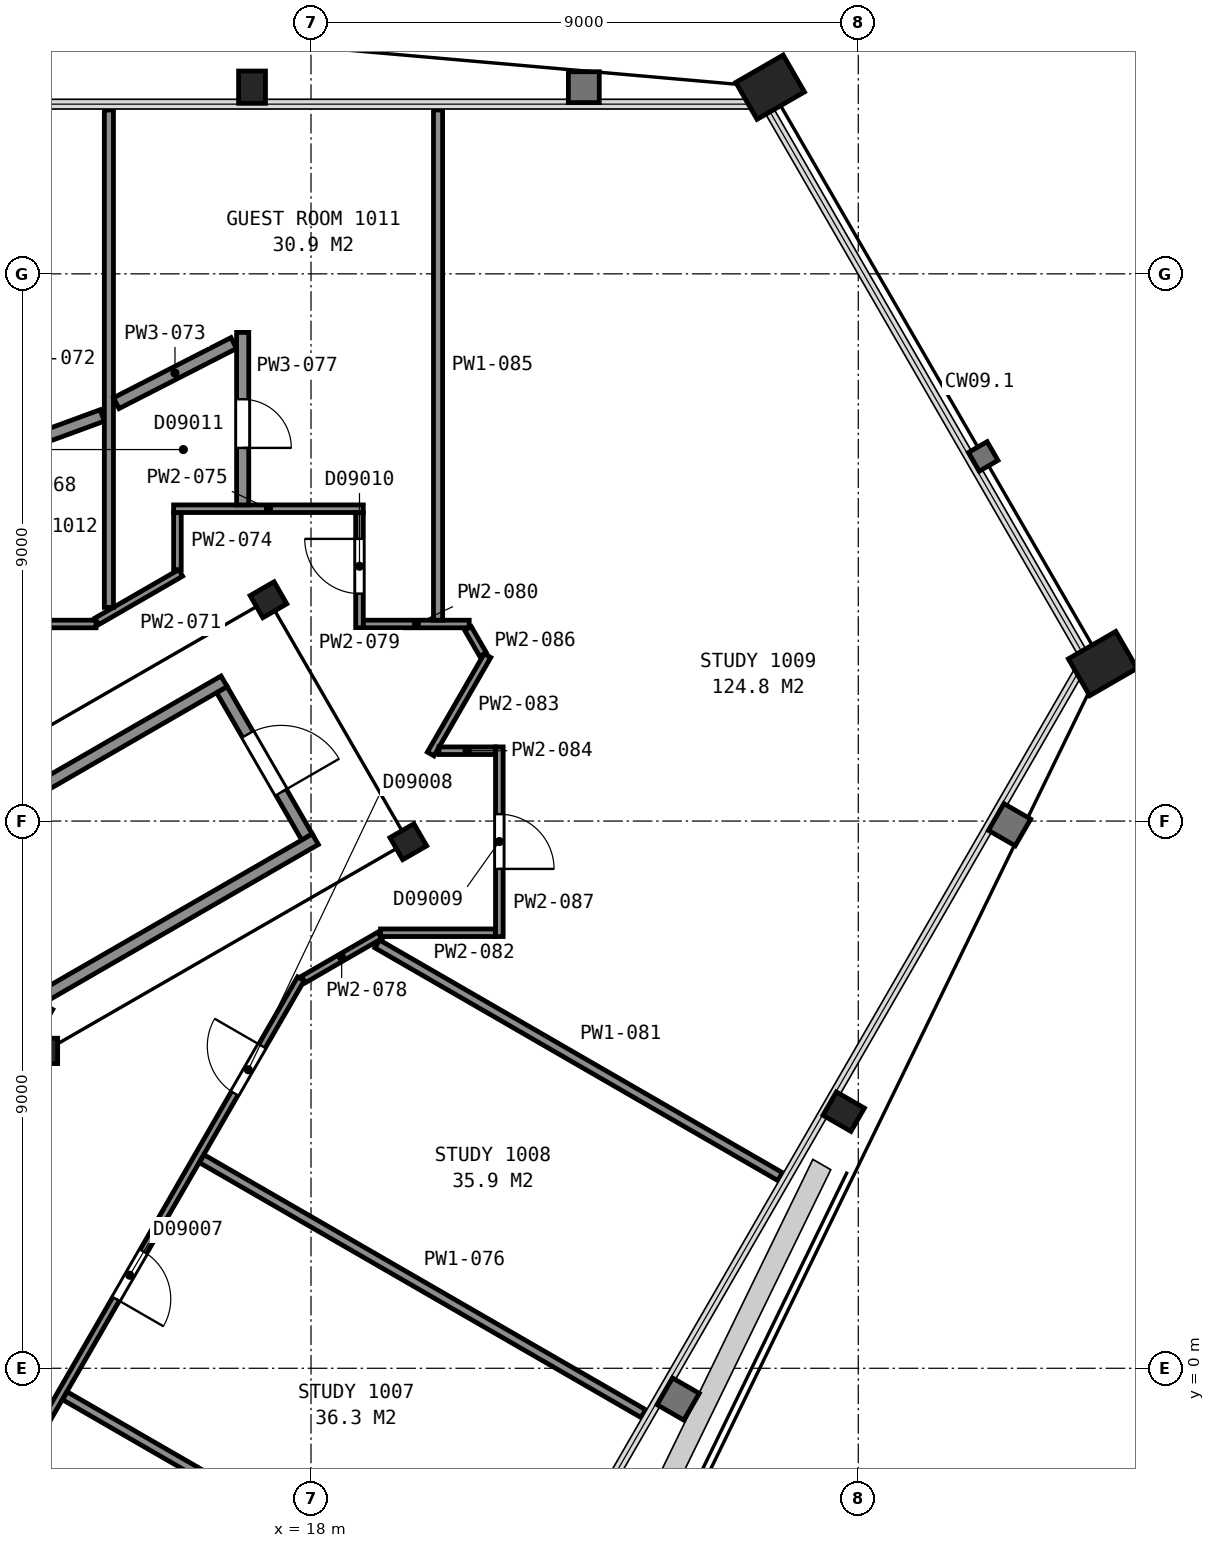
"""IFC4 building model, lengths in metres.
Left out: names, types, materials, properties, quantities, classifications, styles, units other than length and angle.
Written with IfcOpenShell. Run it as: python <this file> out.ifc"""

import sys

from ifc_helpers import new_model, si_unit, direction, frame, frame_2d, origin, origin_2d, place, context, subcontext, project, spatial, rectangle, hollow_rectangle, i_section, extrude, element, fill, save


model = new_model("IFC4")
c1 = context("Model", 3, precision=1e-05, world=origin(), true_north=direction((0.0, 1.0)))
c2 = subcontext(c1, "Body", "Model", "MODEL_VIEW")
j1 = project(units=[si_unit("LENGTHUNIT", "METRE"), si_unit("PLANEANGLEUNIT", "RADIAN")], contexts=[c1])
p1 = place(None, origin())
s1 = spatial("IfcSite", under=j1, at=p1, CompositionType="ELEMENT")
p2 = place(p1, origin())
s2 = spatial("IfcBuilding", under=s1, at=p2, CompositionType="ELEMENT")
p3 = place(p2, frame((0.0, 0.0, 51.2)))
s3 = spatial("IfcBuildingStorey", under=s2, at=p3, CompositionType="ELEMENT", Elevation=51.2)
p4 = place(p3, frame((25.55, 21.07, 0.0), z_axis=(0.0, 0.0, 1.0), x_axis=(0.5, -0.866025403784, 0.0)))
e1 = element("IfcColumn", 1, at=p4, inside=s3, PredefinedType="COLUMN", context=c2, shape_type="SweptSolid", body=[
    extrude(hollow_rectangle(XDim=0.7, YDim=0.9, WallThickness=0.065, at=origin_2d()), origin(), (0.0, 0.0, 1.0), 3.6),
])
for number, where, z_axis, x_axis in (
    (2, (17.03, 21.07, 0.0), (0.0, 0.0, 1.0), (1.0, 0.0, 0.0)),
    (3, (26.76, 4.22, 0.0), (0.0, 0.0, 1.0), (-0.5, -0.866, 0.0)),
):
    element("IfcColumn", number, at=place(p3, frame(where, z_axis=z_axis, x_axis=x_axis)), inside=s3, PredefinedType="COLUMN", context=c2, shape_type="SweptSolid", body=[
        extrude(i_section(OverallWidth=0.442, OverallDepth=0.531, WebThickness=0.066, FlangeThickness=0.106, FilletRadius=0.015, at=origin_2d()), origin(), (0.0, 0.0, 1.0), 3.6),
    ])
p5 = place(p3, frame((31.02, 11.59, 0.0), z_axis=(0.0, 0.0, 1.0), x_axis=(0.5, -0.866025403784, 0.0)))
e4 = element("IfcColumn", 4, at=p5, inside=s3, PredefinedType="COLUMN", context=c2, shape_type="SweptSolid", body=[
    extrude(hollow_rectangle(XDim=0.7, YDim=0.9, WallThickness=0.065, at=origin_2d()), origin(), (0.0, 0.0, 1.0), 3.6),
])
p6 = place(p3, frame((13.63, 5.22, 0.0), z_axis=(0.0, 0.0, 1.0), x_axis=(1.0, 0.0, 0.0)))
e5 = element("IfcColumn", 5, at=p6, inside=s3, PredefinedType="COLUMN", context=c2, shape_type="SweptSolid", body=[
    extrude(i_section(OverallWidth=0.406, OverallDepth=0.417, WebThickness=0.03, FlangeThickness=0.048, FilletRadius=0.015, at=origin_2d()), origin(), (0.0, 0.0, 1.0), 3.6),
])
for number, where, z_axis, x_axis in (
    (6, (19.6, 8.66, 0.0), (0.0, 0.0, 1.0), (0.5, -0.866, 0.0)),
    (7, (17.3, 12.64, 0.0), (0.0, 0.0, 1.0), (0.5, -0.866, 0.0)),
):
    element("IfcColumn", number, at=place(p3, frame(where, z_axis=z_axis, x_axis=x_axis)), inside=s3, PredefinedType="COLUMN", context=c2, shape_type="SweptSolid", body=[
        extrude(i_section(OverallWidth=0.419, OverallDepth=0.455, WebThickness=0.042, FlangeThickness=0.068, FilletRadius=0.015, at=origin_2d()), origin(), (0.0, 0.0, 1.0), 3.6),
    ])
p7 = place(p3, frame((17.934, 8.738, 0.0), z_axis=(0.0, 0.0, 1.0), x_axis=(-0.49998411664, 0.866034573852, 0.0)))
e8 = element("IfcWall", 8, at=p7, inside=s3, PredefinedType="PARTITIONING", context=c2, shape_type="SweptSolid", body=[
    extrude(rectangle(XDim=2.8, YDim=0.2, at=frame_2d((1.4, 0.0))), origin(), (0.0, 0.0, 1.0), 3.35),
])
p8 = place(p7, frame((0.85, 0.0, 0.0)))
e9 = element("IfcOpeningElement", 9, at=p8, cuts=e8, PredefinedType="OPENING", context=c2, shape_type="SweptSolid", body=[
    extrude(rectangle(XDim=1.1, YDim=2.1, at=frame_2d((0.55, 1.05))), frame((0.0, 0.11, 0.0), z_axis=(0.0, -1.0, 0.0), x_axis=(1.0, 0.0, 0.0)), (0.0, 0.0, 1.0), 0.22),
])
for number, where, z_axis, x_axis in (
    (10, (6.178, 5.299, 0.0), (0.0, 0.0, 1.0), (0.866, 0.5, 0.0)),
    (11, (7.678, 2.701, 0.0), (0.0, 0.0, 1.0), (0.866, 0.5, 0.0)),
):
    element("IfcWall", number, at=place(p3, frame(where, z_axis=z_axis, x_axis=x_axis)), inside=s3, PredefinedType="PARTITIONING", context=c2, shape_type="SweptSolid", body=[
        extrude(rectangle(XDim=12.0, YDim=0.2, at=frame_2d((6.0, 0.0))), origin(), (0.0, 0.0, 1.0), 3.35),
    ])
p9 = place(p3, frame((8.492, -3.012, 0.0), z_axis=(0.0, 0.0, 1.0), x_axis=(0.499972957231, 0.866041016371, 0.0)))
e12 = element("IfcWall", 12, at=p9, inside=s3, PredefinedType="PARTITIONING", context=c2, shape_type="SweptSolid", body=[
    extrude(rectangle(XDim=10.349, YDim=0.2, at=frame_2d((5.174, 0.0))), origin(), (0.0, 0.0, 1.0), 3.35),
])
p10 = place(p3, frame((-14.465, 12.241, 0.0), z_axis=(0.0, 0.0, 1.0), x_axis=(1.0, 0.0, 0.0)))
e13 = element("IfcWall", 13, at=p10, inside=s3, PredefinedType="PARTITIONING", context=c2, shape_type="SweptSolid", body=[
    extrude(rectangle(XDim=28.929, YDim=0.125, at=frame_2d((14.465, 0.0))), origin(), (0.0, 0.0, 1.0), 2.613),
])
p11 = place(p10, frame((25.252, 0.0, 0.0)))
e14 = element("IfcOpeningElement", 14, at=p11, cuts=e13, PredefinedType="OPENING", context=c2, shape_type="SweptSolid", body=[
    extrude(rectangle(XDim=0.9, YDim=2.1, at=frame_2d((0.45, 1.05))), frame((0.0, 0.073, 0.0), z_axis=(0.0, -1.0, 0.0), x_axis=(1.0, 0.0, 0.0)), (0.0, 0.0, 1.0), 0.145),
])
p12 = place(p10, frame((22.564, 0.0, 0.0)))
e15 = element("IfcOpeningElement", 15, at=p12, cuts=e13, PredefinedType="OPENING", context=c2, shape_type="SweptSolid", body=[
    extrude(rectangle(XDim=0.9, YDim=2.1, at=frame_2d((0.45, 1.05))), frame((0.0, 0.073, 0.0), z_axis=(0.0, -1.0, 0.0), x_axis=(1.0, 0.0, 0.0)), (0.0, 0.0, 1.0), 0.145),
])
p13 = place(p10, frame((15.302, 0.0, 0.0)))
e16 = element("IfcOpeningElement", 16, at=p13, cuts=e13, PredefinedType="OPENING", context=c2, shape_type="SweptSolid", body=[
    extrude(rectangle(XDim=0.9, YDim=2.1, at=frame_2d((0.45, 1.05))), frame((0.0, 0.073, 0.0), z_axis=(0.0, -1.0, 0.0), x_axis=(1.0, 0.0, 0.0)), (0.0, 0.0, 1.0), 0.145),
])
p14 = place(p10, frame((12.365, 0.0, 0.0)))
e17 = element("IfcOpeningElement", 17, at=p14, cuts=e13, PredefinedType="OPENING", context=c2, shape_type="SweptSolid", body=[
    extrude(rectangle(XDim=0.9, YDim=2.1, at=frame_2d((0.45, 1.05))), frame((0.0, 0.073, 0.0), z_axis=(0.0, -1.0, 0.0), x_axis=(1.0, 0.0, 0.0)), (0.0, 0.0, 1.0), 0.145),
])
p15 = place(p10, frame((5.477, 0.0, 0.0)))
e18 = element("IfcOpeningElement", 18, at=p15, cuts=e13, PredefinedType="OPENING", context=c2, shape_type="SweptSolid", body=[
    extrude(rectangle(XDim=0.9, YDim=2.1, at=frame_2d((0.45, 1.05))), frame((0.0, 0.073, 0.0), z_axis=(0.0, -1.0, 0.0), x_axis=(1.0, 0.0, 0.0)), (0.0, 0.0, 1.0), 0.145),
])
p16 = place(p10, frame((2.789, 0.0, 0.0)))
e19 = element("IfcOpeningElement", 19, at=p16, cuts=e13, PredefinedType="OPENING", context=c2, shape_type="SweptSolid", body=[
    extrude(rectangle(XDim=0.9, YDim=2.1, at=frame_2d((0.45, 1.05))), frame((0.0, 0.073, 0.0), z_axis=(0.0, -1.0, 0.0), x_axis=(1.0, 0.0, 0.0)), (0.0, 0.0, 1.0), 0.145),
])
p17 = place(p3, frame((17.833, 6.406, 0.0), z_axis=(0.0, 0.0, 1.0), x_axis=(-0.500002884005, -0.866023738697, 0.0)))
e20 = element("IfcWall", 20, at=p17, inside=s3, PredefinedType="PARTITIONING", context=c2, shape_type="SweptSolid", body=[
    extrude(rectangle(XDim=28.135, YDim=0.125, at=frame_2d((14.067, 0.0))), origin(), (0.0, 0.0, 1.0), 2.613),
])
p18 = place(p17, frame((26.522, 0.0, 0.0)))
e21 = element("IfcOpeningElement", 21, at=p18, cuts=e20, PredefinedType="OPENING", context=c2, shape_type="SweptSolid", body=[
    extrude(rectangle(XDim=0.9, YDim=2.1, at=frame_2d((0.45, 1.05))), frame((0.0, 0.073, 0.0), z_axis=(0.0, -1.0, 0.0), x_axis=(1.0, 0.0, 0.0)), (0.0, 0.0, 1.0), 0.145),
])
p19 = place(p17, frame((23.184, 0.0, 0.0)))
e22 = element("IfcOpeningElement", 22, at=p19, cuts=e20, PredefinedType="OPENING", context=c2, shape_type="SweptSolid", body=[
    extrude(rectangle(XDim=0.9, YDim=2.1, at=frame_2d((0.45, 1.05))), frame((0.0, 0.073, 0.0), z_axis=(0.0, -1.0, 0.0), x_axis=(1.0, 0.0, 0.0)), (0.0, 0.0, 1.0), 0.145),
])
p20 = place(p17, frame((18.683, 0.0, 0.0)))
e23 = element("IfcOpeningElement", 23, at=p20, cuts=e20, PredefinedType="OPENING", context=c2, shape_type="SweptSolid", body=[
    extrude(rectangle(XDim=0.9, YDim=2.1, at=frame_2d((0.45, 1.05))), frame((0.0, 0.073, 0.0), z_axis=(0.0, -1.0, 0.0), x_axis=(1.0, 0.0, 0.0)), (0.0, 0.0, 1.0), 0.145),
])
p21 = place(p17, frame((14.182, 0.0, 0.0)))
e24 = element("IfcOpeningElement", 24, at=p21, cuts=e20, PredefinedType="OPENING", context=c2, shape_type="SweptSolid", body=[
    extrude(rectangle(XDim=0.9, YDim=2.1, at=frame_2d((0.45, 1.05))), frame((0.0, 0.073, 0.0), z_axis=(0.0, -1.0, 0.0), x_axis=(1.0, 0.0, 0.0)), (0.0, 0.0, 1.0), 0.145),
])
p22 = place(p17, frame((9.681, 0.0, 0.0)))
e25 = element("IfcOpeningElement", 25, at=p22, cuts=e20, PredefinedType="OPENING", context=c2, shape_type="SweptSolid", body=[
    extrude(rectangle(XDim=0.9, YDim=2.1, at=frame_2d((0.45, 1.05))), frame((0.0, 0.073, 0.0), z_axis=(0.0, -1.0, 0.0), x_axis=(1.0, 0.0, 0.0)), (0.0, 0.0, 1.0), 0.145),
])
p23 = place(p17, frame((5.18, 0.0, 0.0)))
e26 = element("IfcOpeningElement", 26, at=p23, cuts=e20, PredefinedType="OPENING", context=c2, shape_type="SweptSolid", body=[
    extrude(rectangle(XDim=0.9, YDim=2.1, at=frame_2d((0.45, 1.05))), frame((0.0, 0.073, 0.0), z_axis=(0.0, -1.0, 0.0), x_axis=(1.0, 0.0, 0.0)), (0.0, 0.0, 1.0), 0.145),
])
p24 = place(p17, frame((1.278, 0.0, 0.0)))
e27 = element("IfcOpeningElement", 27, at=p24, cuts=e20, PredefinedType="OPENING", context=c2, shape_type="SweptSolid", body=[
    extrude(rectangle(XDim=0.9, YDim=2.1, at=frame_2d((0.45, 1.05))), frame((0.0, 0.073, 0.0), z_axis=(0.0, -1.0, 0.0), x_axis=(1.0, 0.0, 0.0)), (0.0, 0.0, 1.0), 0.145),
])
p25 = place(p3, frame((12.698, 14.986, 0.0), z_axis=(0.0, 0.0, 1.0), x_axis=(0.938894816734, 0.344204188105, 0.0)))
e28 = element("IfcWall", 28, at=p25, inside=s3, PredefinedType="PARTITIONING", context=c2, shape_type="SweptSolid", body=[
    extrude(rectangle(XDim=1.99, YDim=0.2, at=frame_2d((0.995, 0.0))), origin(), (0.0, 0.0, 1.0), 2.613),
])
p26 = place(p3, frame((13.951, -0.452, 0.0), z_axis=(0.0, 0.0, 1.0), x_axis=(0.866027553047, -0.499996277349, 0.0)))
e29 = element("IfcWall", 29, at=p26, inside=s3, PredefinedType="PARTITIONING", context=c2, shape_type="SweptSolid", body=[
    extrude(rectangle(XDim=8.387, YDim=0.15, at=frame_2d((4.193, 0.0))), origin(), (0.0, 0.0, 1.0), 2.613),
])
p27 = place(p3, frame((14.476, 12.283, 0.0), z_axis=(0.0, 0.0, 1.0), x_axis=(0.865974057503, 0.500088923824, 0.0)))
e30 = element("IfcWall", 30, at=p27, inside=s3, PredefinedType="PARTITIONING", context=c2, shape_type="SweptSolid", body=[
    extrude(rectangle(XDim=1.595, YDim=0.125, at=frame_2d((0.798, 0.0))), origin(), (0.0, 0.0, 1.0), 2.613),
])
p28 = place(p3, frame((14.676, 12.514, 0.0), z_axis=(0.0, 0.0, 1.0), x_axis=(0.0, 1.0, 0.0)))
e31 = element("IfcWall", 31, at=p28, inside=s3, PredefinedType="PARTITIONING", context=c2, shape_type="SweptSolid", body=[
    extrude(rectangle(XDim=8.181, YDim=0.15, at=frame_2d((4.09, 0.0))), origin(), (0.0, 0.0, 1.0), 2.613),
])
p29 = place(p3, frame((14.797, 15.873, 0.0), z_axis=(0.0, 0.0, 1.0), x_axis=(0.890181338078, 0.455606392995, 0.0)))
e32 = element("IfcWall", 32, at=p29, inside=s3, PredefinedType="PARTITIONING", context=c2, shape_type="SweptSolid", body=[
    extrude(rectangle(XDim=2.171, YDim=0.2, at=frame_2d((1.085, 0.0))), origin(), (0.0, 0.0, 1.0), 2.613),
])
p30 = place(p3, frame((15.803, 13.135, 0.0), z_axis=(0.0, 0.0, 1.0), x_axis=(0.0, 1.0, 0.0)))
e33 = element("IfcWall", 33, at=p30, inside=s3, PredefinedType="PARTITIONING", context=c2, shape_type="SweptSolid", body=[
    extrude(rectangle(XDim=0.937, YDim=0.125, at=frame_2d((0.469, 0.0))), origin(), (0.0, 0.0, 1.0), 2.613),
])
p31 = place(p3, frame((15.74, 14.137, 0.0), z_axis=(0.0, 0.0, 1.0), x_axis=(1.0, 0.0, 0.0)))
e34 = element("IfcWall", 34, at=p31, inside=s3, PredefinedType="PARTITIONING", context=c2, shape_type="SweptSolid", body=[
    extrude(rectangle(XDim=3.119, YDim=0.125, at=frame_2d((1.56, 0.0))), origin(), (0.0, 0.0, 1.0), 2.613),
])
p32 = place(p3, frame((16.202, 3.447, 0.0), z_axis=(0.0, 0.0, 1.0), x_axis=(0.866047434595, -0.499961839574, 0.0)))
e35 = element("IfcWall", 35, at=p32, inside=s3, PredefinedType="PARTITIONING", context=c2, shape_type="SweptSolid", body=[
    extrude(rectangle(XDim=8.387, YDim=0.15, at=frame_2d((4.193, 0.0))), origin(), (0.0, 0.0, 1.0), 2.613),
])
p33 = place(p3, frame((16.876, 14.199, 0.0), z_axis=(0.0, 0.0, 1.0), x_axis=(0.0, 1.0, 0.0)))
e36 = element("IfcWall", 36, at=p33, inside=s3, PredefinedType="PARTITIONING", context=c2, shape_type="SweptSolid", body=[
    extrude(rectangle(XDim=2.838, YDim=0.2, at=frame_2d((1.419, 0.0))), origin(), (0.0, 0.0, 1.0), 2.613),
])
p34 = place(p33, frame((0.938, 0.0, 0.0)))
e37 = element("IfcOpeningElement", 37, at=p34, cuts=e36, PredefinedType="OPENING", context=c2, shape_type="SweptSolid", body=[
    extrude(rectangle(XDim=0.8, YDim=2.1, at=frame_2d((0.4, 1.05))), frame((0.0, 0.11, 0.0), z_axis=(0.0, -1.0, 0.0), x_axis=(1.0, 0.0, 0.0)), (0.0, 0.0, 1.0), 0.22),
])
p35 = place(p3, frame((17.875, 6.395, 0.0), z_axis=(0.0, 0.0, 1.0), x_axis=(0.865894215669, 0.500227155672, 0.0)))
e38 = element("IfcWall", 38, at=p35, inside=s3, PredefinedType="PARTITIONING", context=c2, shape_type="SweptSolid", body=[
    extrude(rectangle(XDim=1.451, YDim=0.125, at=frame_2d((0.726, 0.0))), origin(), (0.0, 0.0, 1.0), 2.613),
])
p36 = place(p3, frame((18.797, 14.072, 0.0), z_axis=(0.0, 0.0, 1.0), x_axis=(0.0, -1.0, 0.0)))
e39 = element("IfcWall", 39, at=p36, inside=s3, PredefinedType="PARTITIONING", context=c2, shape_type="SweptSolid", body=[
    extrude(rectangle(XDim=1.894, YDim=0.125, at=frame_2d((0.947, 0.0))), origin(), (0.0, 0.0, 1.0), 2.613),
])
p37 = place(p36, frame((0.431, 0.0, 0.0)))
e40 = element("IfcOpeningElement", 40, at=p37, cuts=e39, PredefinedType="OPENING", context=c2, shape_type="SweptSolid", body=[
    extrude(rectangle(XDim=0.9, YDim=2.1, at=frame_2d((0.45, 1.05))), frame((0.0, 0.073, 0.0), z_axis=(0.0, -1.0, 0.0), x_axis=(1.0, 0.0, 0.0)), (0.0, 0.0, 1.0), 0.145),
])
p38 = place(p3, frame((18.862, 12.241, 0.0), z_axis=(0.0, 0.0, 1.0), x_axis=(1.0, 0.0, 0.0)))
e41 = element("IfcWall", 41, at=p38, inside=s3, PredefinedType="PARTITIONING", context=c2, shape_type="SweptSolid", body=[
    extrude(rectangle(XDim=1.74, YDim=0.125, at=frame_2d((0.87, 0.0))), origin(), (0.0, 0.0, 1.0), 2.613),
])
p39 = place(p3, frame((19.088, 6.979, 0.0), z_axis=(0.0, 0.0, 1.0), x_axis=(0.865990629129, -0.500060226633, 0.0)))
e42 = element("IfcWall", 42, at=p39, inside=s3, PredefinedType="PARTITIONING", context=c2, shape_type="SweptSolid", body=[
    extrude(rectangle(XDim=7.654, YDim=0.15, at=frame_2d((3.827, 0.0))), origin(), (0.0, 0.0, 1.0), 2.613),
])
p40 = place(p3, frame((19.144, 7.163, 0.0), z_axis=(0.0, 0.0, 1.0), x_axis=(1.0, 0.0, 0.0)))
e43 = element("IfcWall", 43, at=p40, inside=s3, PredefinedType="PARTITIONING", context=c2, shape_type="SweptSolid", body=[
    extrude(rectangle(XDim=1.888, YDim=0.125, at=frame_2d((0.944, 0.0))), origin(), (0.0, 0.0, 1.0), 2.613),
])
p41 = place(p3, frame((19.968, 10.103, 0.0), z_axis=(0.0, 0.0, 1.0), x_axis=(0.500072997275, 0.865983254686, 0.0)))
e44 = element("IfcWall", 44, at=p41, inside=s3, PredefinedType="PARTITIONING", context=c2, shape_type="SweptSolid", body=[
    extrude(rectangle(XDim=1.869, YDim=0.125, at=frame_2d((0.935, 0.0))), origin(), (0.0, 0.0, 1.0), 2.613),
])
p42 = place(p3, frame((20.104, 10.157, 0.0), z_axis=(0.0, 0.0, 1.0), x_axis=(1.0, 0.0, 0.0)))
e45 = element("IfcWall", 45, at=p42, inside=s3, PredefinedType="PARTITIONING", context=c2, shape_type="SweptSolid", body=[
    extrude(rectangle(XDim=0.928, YDim=0.125, at=frame_2d((0.464, 0.0))), origin(), (0.0, 0.0, 1.0), 2.613),
])
p43 = place(p3, frame((20.089, 12.303, 0.0), z_axis=(0.0, 0.0, 1.0), x_axis=(0.0, 1.0, 0.0)))
e46 = element("IfcWall", 46, at=p43, inside=s3, PredefinedType="PARTITIONING", context=c2, shape_type="SweptSolid", body=[
    extrude(rectangle(XDim=8.392, YDim=0.15, at=frame_2d((4.196, 0.0))), origin(), (0.0, 0.0, 1.0), 2.613),
])
p44 = place(p3, frame((20.582, 12.167, 0.0), z_axis=(0.0, 0.0, 1.0), x_axis=(0.500450775723, -0.86576499183, 0.0)))
e47 = element("IfcWall", 47, at=p44, inside=s3, PredefinedType="PARTITIONING", context=c2, shape_type="SweptSolid", body=[
    extrude(rectangle(XDim=0.493, YDim=0.125, at=frame_2d((0.247, 0.0))), origin(), (0.0, 0.0, 1.0), 2.613),
])
p45 = place(p3, frame((21.097, 10.219, 0.0), z_axis=(0.0, 0.0, 1.0), x_axis=(0.0, -1.0, 0.0)))
e48 = element("IfcWall", 48, at=p45, inside=s3, PredefinedType="PARTITIONING", context=c2, shape_type="SweptSolid", body=[
    extrude(rectangle(XDim=3.119, YDim=0.125, at=frame_2d((1.56, 0.0))), origin(), (0.0, 0.0, 1.0), 2.613),
])
p46 = place(p45, frame((1.106, 0.0, 0.0)))
e49 = element("IfcOpeningElement", 49, at=p46, cuts=e48, PredefinedType="OPENING", context=c2, shape_type="SweptSolid", body=[
    extrude(rectangle(XDim=0.9, YDim=2.1, at=frame_2d((0.45, 1.05))), frame((0.0, 0.073, 0.0), z_axis=(0.0, -1.0, 0.0), x_axis=(1.0, 0.0, 0.0)), (0.0, 0.0, 1.0), 0.145),
])
p47 = place(p8, origin())
e50 = element("IfcDoor", 50, at=p47, inside=s3, OperationType="SINGLE_SWING_LEFT", PredefinedType="DOOR", context=c2, shape_type="SweptSolid", body=[
    extrude(rectangle(XDim=1.1, YDim=2.1, at=frame_2d((0.55, 1.05))), frame((0.0, 0.025, 0.0), z_axis=(0.0, -1.0, 0.0), x_axis=(1.0, 0.0, 0.0)), (0.0, 0.0, 1.0), 0.05),
])
fill(e9, e50)
p48 = place(p23, origin())
e51 = element("IfcDoor", 51, at=p48, inside=s3, OperationType="SINGLE_SWING_RIGHT", PredefinedType="DOOR", context=c2, shape_type="SweptSolid", body=[
    extrude(rectangle(XDim=0.9, YDim=2.1, at=frame_2d((0.45, 1.05))), frame((0.0, 0.025, 0.0), z_axis=(0.0, -1.0, 0.0), x_axis=(1.0, 0.0, 0.0)), (0.0, 0.0, 1.0), 0.05),
])
fill(e26, e51)
p49 = place(p24, origin())
e52 = element("IfcDoor", 52, at=p49, inside=s3, OperationType="SINGLE_SWING_LEFT", PredefinedType="DOOR", context=c2, shape_type="SweptSolid", body=[
    extrude(rectangle(XDim=0.9, YDim=2.1, at=frame_2d((0.45, 1.05))), frame((0.0, 0.025, 0.0), z_axis=(0.0, -1.0, 0.0), x_axis=(1.0, 0.0, 0.0)), (0.0, 0.0, 1.0), 0.05),
])
fill(e27, e52)
p50 = place(p34, origin())
e53 = element("IfcDoor", 53, at=p50, inside=s3, OperationType="SINGLE_SWING_LEFT", PredefinedType="DOOR", context=c2, shape_type="SweptSolid", body=[
    extrude(rectangle(XDim=0.8, YDim=2.1, at=frame_2d((0.4, 1.05))), frame((0.0, 0.025, 0.0), z_axis=(0.0, -1.0, 0.0), x_axis=(1.0, 0.0, 0.0)), (0.0, 0.0, 1.0), 0.05),
])
fill(e37, e53)
p51 = place(p37, origin())
e54 = element("IfcDoor", 54, at=p51, inside=s3, OperationType="SINGLE_SWING_LEFT", PredefinedType="DOOR", context=c2, shape_type="SweptSolid", body=[
    extrude(rectangle(XDim=0.9, YDim=2.1, at=frame_2d((0.45, 1.05))), frame((0.0, 0.025, 0.0), z_axis=(0.0, -1.0, 0.0), x_axis=(1.0, 0.0, 0.0)), (0.0, 0.0, 1.0), 0.05),
])
fill(e40, e54)
p52 = place(p46, origin())
e55 = element("IfcDoor", 55, at=p52, inside=s3, OperationType="SINGLE_SWING_RIGHT", PredefinedType="DOOR", context=c2, shape_type="SweptSolid", body=[
    extrude(rectangle(XDim=0.9, YDim=2.1, at=frame_2d((0.45, 1.05))), frame((0.0, 0.025, 0.0), z_axis=(0.0, -1.0, 0.0), x_axis=(1.0, 0.0, 0.0)), (0.0, 0.0, 1.0), 0.05),
])
fill(e49, e55)
save(model, sys.argv[1])
